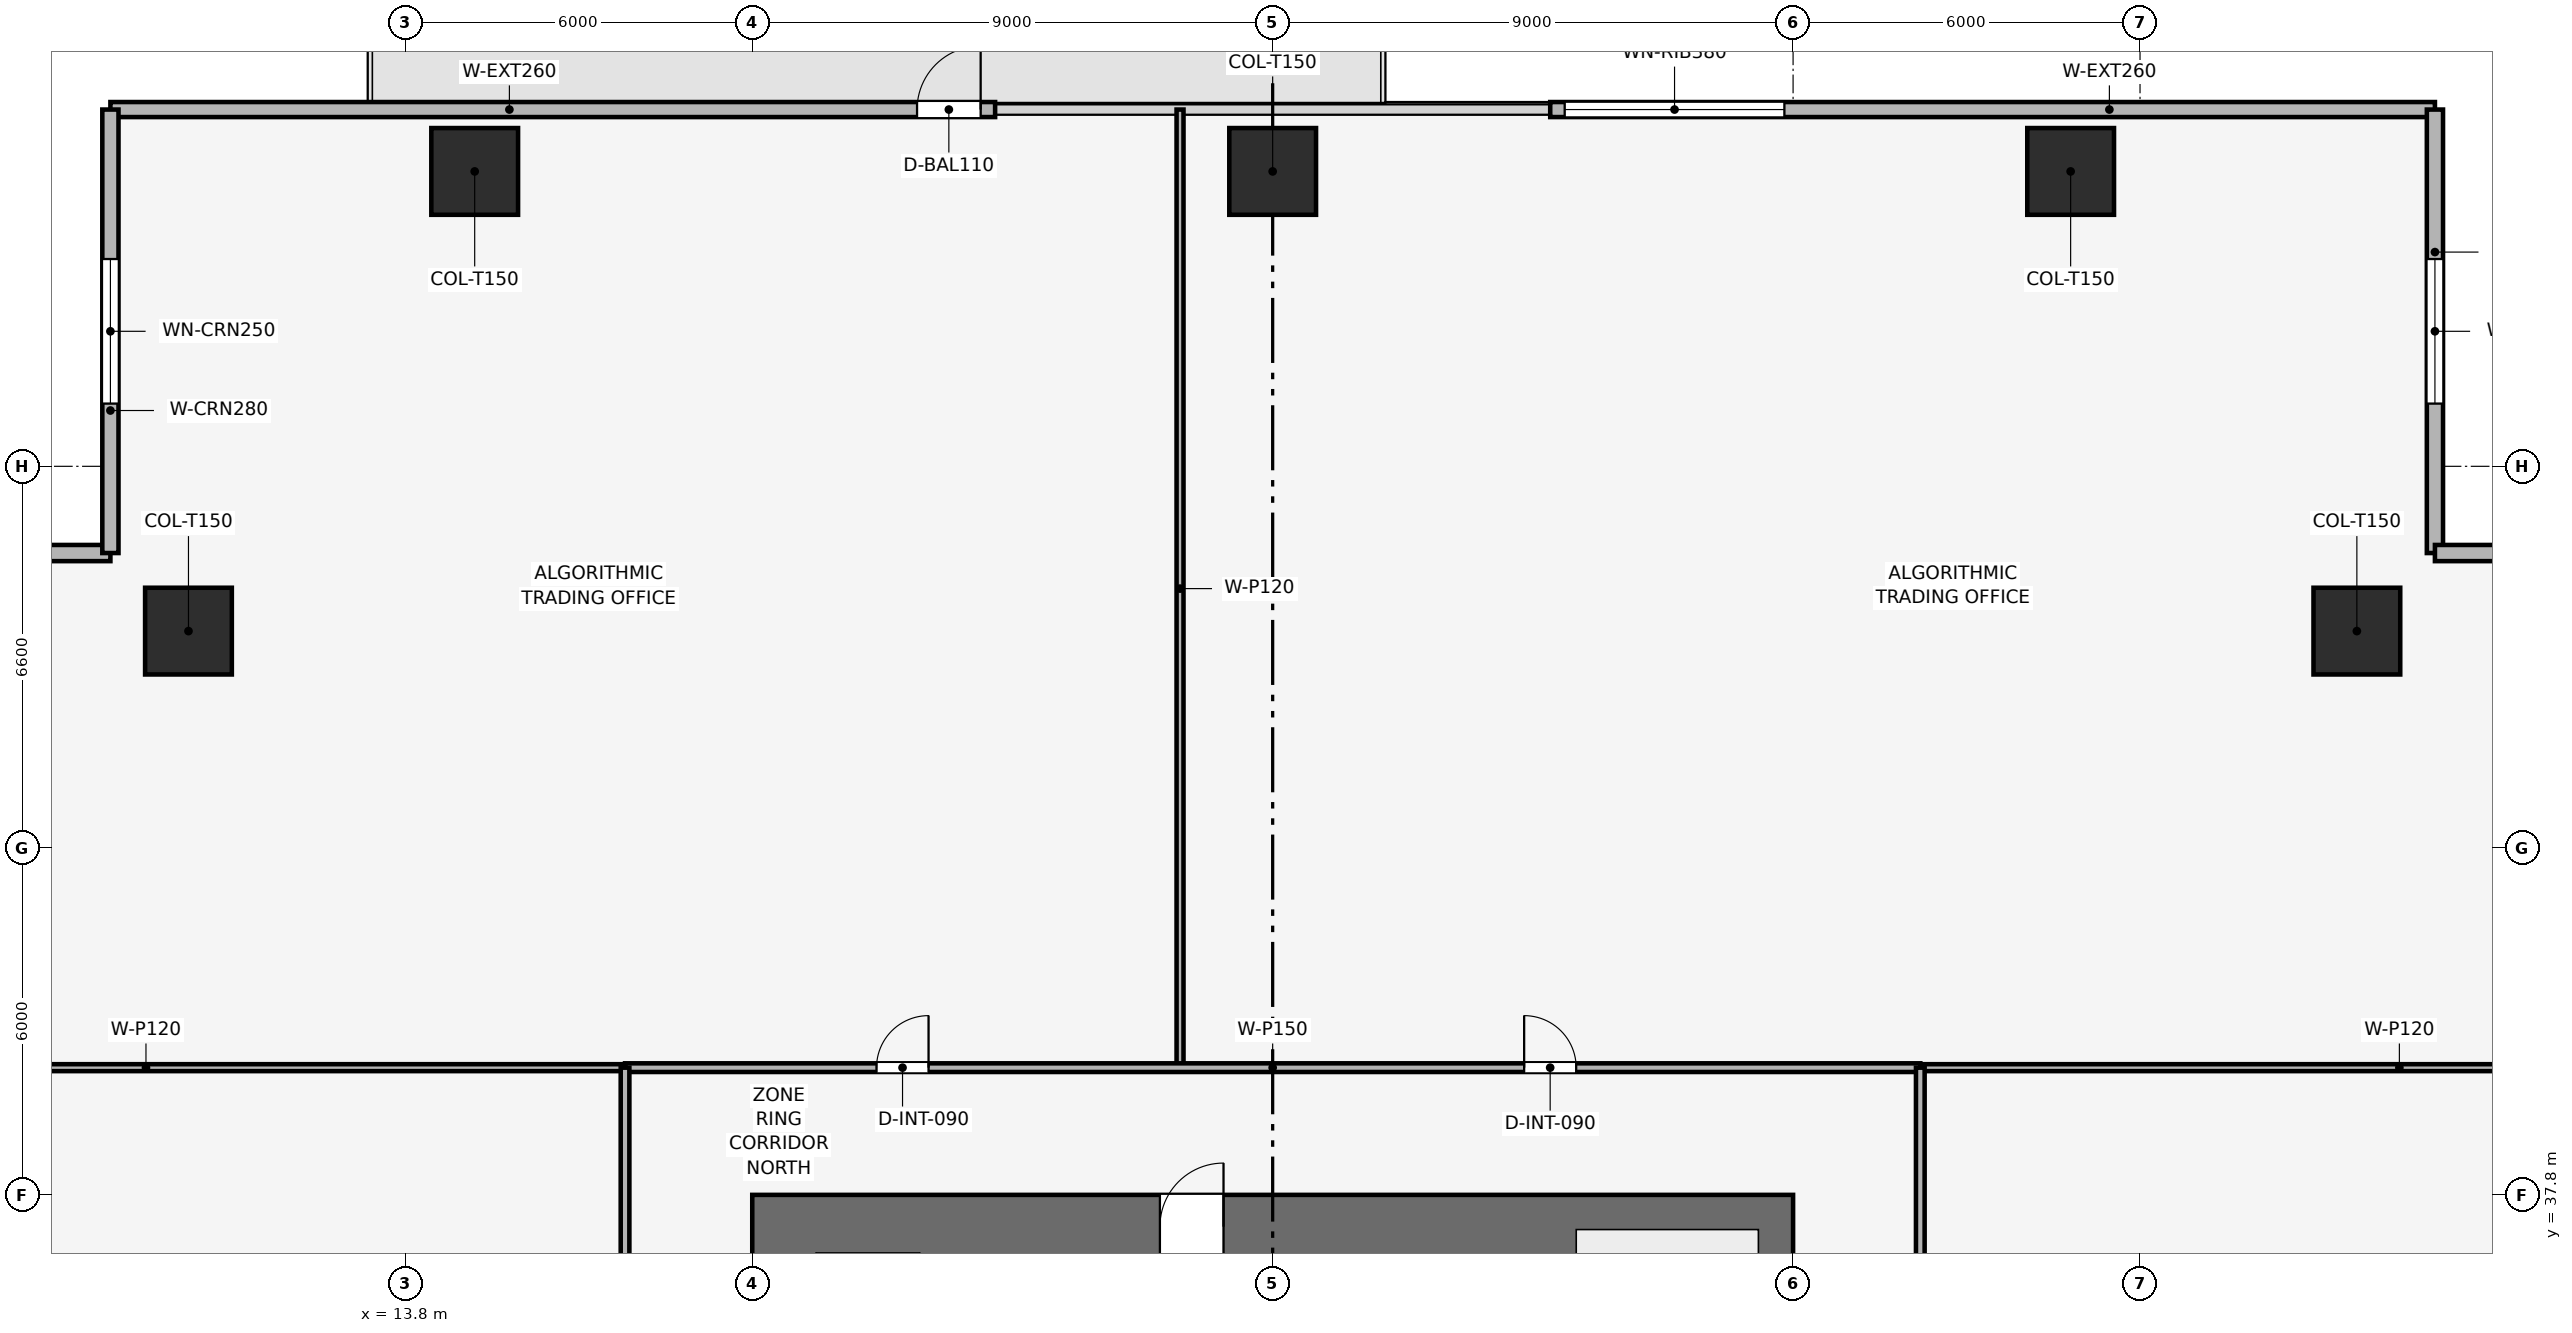
"""IFC4 building model, lengths in metres.
Left out: names, types, materials, properties, quantities, classifications, styles, units other than length and angle.
Written with IfcOpenShell. Run it as: python <this file> out.ifc"""

import sys

from ifc_helpers import new_model, si_unit, direction, frame, frame_2d, origin, origin_2d, place, context, subcontext, project, spatial, rectangle, extrude, element, fill, save


model = new_model("IFC4")
c1 = context("Model", 3, precision=1e-05, world=origin(), true_north=direction((0.0, 1.0)))
c2 = subcontext(c1, "Body", "Model", "MODEL_VIEW")
j1 = project(units=[si_unit("LENGTHUNIT", "METRE"), si_unit("PLANEANGLEUNIT", "RADIAN")], contexts=[c1])
p1 = place(None, origin())
s1 = spatial("IfcSite", under=j1, at=p1, CompositionType="ELEMENT")
p2 = place(p1, origin())
s2 = spatial("IfcBuilding", under=s1, at=p2, CompositionType="ELEMENT")
p3 = place(p2, frame((0.0, 0.0, 84.6)))
s3 = spatial("IfcBuildingStorey", under=s2, at=p3, CompositionType="ELEMENT", Elevation=84.6)
p4 = place(p3, frame((19.8, 37.25, 0.0), z_axis=(0.0, 0.0, 1.0), x_axis=(1.0, 0.0, 0.0)))
e1 = element("IfcWall", 1, at=p4, inside=s3, PredefinedType="SHEAR", context=c2, shape_type="SweptSolid", body=[
    extrude(rectangle(XDim=18.0, YDim=1.1, at=frame_2d((9.0, 0.0))), origin(), (0.0, 0.0, 1.0), 3.9),
])
p5 = place(p4, frame((7.05, 0.0, 0.0)))
e2 = element("IfcOpeningElement", 2, at=p5, cuts=e1, PredefinedType="OPENING", context=c2, shape_type="SweptSolid", body=[
    extrude(rectangle(XDim=1.1, YDim=2.15, at=frame_2d((0.55, 1.075))), frame((0.0, 0.56, 0.0), z_axis=(0.0, -1.0, 0.0), x_axis=(1.0, 0.0, 0.0)), (0.0, 0.0, 1.0), 1.12),
])
for number, where, z_axis, x_axis in (
    (3, (42.6, 55.5, 0.003), (0.0, 0.0, 1.0), (1.0, 0.0, 0.0)),
    (4, (28.8, 55.5, 0.003), (0.0, 0.0, 1.0), (1.0, 0.0, 0.0)),
    (5, (15.0, 55.5, 0.003), (0.0, 0.0, 1.0), (1.0, 0.0, 0.0)),
    (6, (47.55, 47.55, 0.003), (0.0, 0.0, 1.0), (1.0, 0.0, 0.0)),
    (7, (10.05, 47.55, 0.003), (0.0, 0.0, 1.0), (1.0, 0.0, 0.0)),
):
    element("IfcColumn", number, at=place(p3, frame(where, z_axis=z_axis, x_axis=x_axis)), inside=s3, PredefinedType="COLUMN", context=c2, shape_type="SweptSolid", body=[
        extrude(rectangle(XDim=1.5, YDim=1.5, at=origin_2d()), origin(), (0.0, 0.0, 1.0), 3.644),
    ])
p6 = place(p3, frame((8.7, 56.57, 0.0), z_axis=(0.0, 0.0, 1.0), x_axis=(1.0, 0.0, 0.0)))
e8 = element("IfcWall", 8, at=p6, inside=s3, PredefinedType="SOLIDWALL", context=c2, shape_type="SweptSolid", body=[
    extrude(rectangle(XDim=15.3, YDim=0.26, at=frame_2d((7.65, 0.0))), origin(), (0.0, 0.0, 1.0), 3.65),
])
p7 = place(p6, frame((13.95, 0.0, 0.0)))
e9 = element("IfcOpeningElement", 9, at=p7, cuts=e8, PredefinedType="OPENING", context=c2, shape_type="SweptSolid", body=[
    extrude(rectangle(XDim=1.1, YDim=2.2, at=frame_2d((0.55, 1.1))), frame((0.0, 0.14, 0.0), z_axis=(0.0, -1.0, 0.0), x_axis=(1.0, 0.0, 0.0)), (0.0, 0.0, 1.0), 0.28),
])
p8 = place(p3, frame((33.6, 56.57, 0.0), z_axis=(0.0, 0.0, 1.0), x_axis=(1.0, 0.0, 0.0)))
e10 = element("IfcWall", 10, at=p8, inside=s3, PredefinedType="SOLIDWALL", context=c2, shape_type="SweptSolid", body=[
    extrude(rectangle(XDim=15.3, YDim=0.26, at=frame_2d((7.65, 0.0))), origin(), (0.0, 0.0, 1.0), 3.65),
])
p9 = place(p8, frame((0.25, 0.0, 0.9)))
e11 = element("IfcOpeningElement", 11, at=p9, cuts=e10, PredefinedType="OPENING", context=c2, shape_type="SweptSolid", body=[
    extrude(rectangle(XDim=3.8, YDim=1.9, at=frame_2d((1.9, 0.95))), frame((0.0, 0.14, 0.0), z_axis=(0.0, -1.0, 0.0), x_axis=(1.0, 0.0, 0.0)), (0.0, 0.0, 1.0), 0.28),
])
p10 = place(p3, frame((1.03, 48.9, 0.0), z_axis=(0.0, 0.0, 1.0), x_axis=(1.0, 0.0, 0.0)))
e12 = element("IfcWall", 12, at=p10, inside=s3, PredefinedType="SOLIDWALL", context=c2, shape_type="SweptSolid", body=[
    extrude(rectangle(XDim=7.67, YDim=0.28, at=frame_2d((3.835, 0.0))), origin(), (0.0, 0.0, 1.0), 3.65),
])
p11 = place(p10, frame((2.585, 0.0, 0.9)))
e13 = element("IfcOpeningElement", 13, at=p11, cuts=e12, PredefinedType="OPENING", context=c2, shape_type="SweptSolid", body=[
    extrude(rectangle(XDim=2.5, YDim=1.9, at=frame_2d((1.25, 0.95))), frame((0.0, 0.15, 0.0), z_axis=(0.0, -1.0, 0.0), x_axis=(1.0, 0.0, 0.0)), (0.0, 0.0, 1.0), 0.3),
])
p12 = place(p3, frame((8.7, 48.9, 0.0), z_axis=(0.0, 0.0, 1.0), x_axis=(0.0, 1.0, 0.0)))
e14 = element("IfcWall", 14, at=p12, inside=s3, PredefinedType="SOLIDWALL", context=c2, shape_type="SweptSolid", body=[
    extrude(rectangle(XDim=7.67, YDim=0.28, at=frame_2d((3.835, 0.0))), origin(), (0.0, 0.0, 1.0), 3.65),
])
p13 = place(p12, frame((2.585, 0.0, 0.9)))
e15 = element("IfcOpeningElement", 15, at=p13, cuts=e14, PredefinedType="OPENING", context=c2, shape_type="SweptSolid", body=[
    extrude(rectangle(XDim=2.5, YDim=1.9, at=frame_2d((1.25, 0.95))), frame((0.0, 0.15, 0.0), z_axis=(0.0, -1.0, 0.0), x_axis=(1.0, 0.0, 0.0)), (0.0, 0.0, 1.0), 0.3),
])
p14 = place(p3, frame((48.9, 56.57, 0.0), z_axis=(0.0, 0.0, 1.0), x_axis=(0.0, -1.0, 0.0)))
e16 = element("IfcWall", 16, at=p14, inside=s3, PredefinedType="SOLIDWALL", context=c2, shape_type="SweptSolid", body=[
    extrude(rectangle(XDim=7.67, YDim=0.28, at=frame_2d((3.835, 0.0))), origin(), (0.0, 0.0, 1.0), 3.65),
])
p15 = place(p14, frame((2.585, 0.0, 0.9)))
e17 = element("IfcOpeningElement", 17, at=p15, cuts=e16, PredefinedType="OPENING", context=c2, shape_type="SweptSolid", body=[
    extrude(rectangle(XDim=2.5, YDim=1.9, at=frame_2d((1.25, 0.95))), frame((0.0, 0.15, 0.0), z_axis=(0.0, -1.0, 0.0), x_axis=(1.0, 0.0, 0.0)), (0.0, 0.0, 1.0), 0.3),
])
p16 = place(p3, frame((48.9, 48.9, 0.0), z_axis=(0.0, 0.0, 1.0), x_axis=(1.0, 0.0, 0.0)))
e18 = element("IfcWall", 18, at=p16, inside=s3, PredefinedType="SOLIDWALL", context=c2, shape_type="SweptSolid", body=[
    extrude(rectangle(XDim=7.67, YDim=0.28, at=frame_2d((3.835, 0.0))), origin(), (0.0, 0.0, 1.0), 3.65),
])
p17 = place(p16, frame((2.585, 0.0, 0.9)))
e19 = element("IfcOpeningElement", 19, at=p17, cuts=e18, PredefinedType="OPENING", context=c2, shape_type="SweptSolid", body=[
    extrude(rectangle(XDim=2.5, YDim=1.9, at=frame_2d((1.25, 0.95))), frame((0.0, 0.15, 0.0), z_axis=(0.0, -1.0, 0.0), x_axis=(1.0, 0.0, 0.0)), (0.0, 0.0, 1.0), 0.3),
])
for number, where, z_axis, x_axis in (
    (20, (27.198, 40.0, 0.0), (0.0, 0.0, 1.0), (0.0, 1.0, 0.0)),
    (21, (1.03, 40.0, 0.0), (0.0, 0.0, 1.0), (1.0, 0.0, 0.0)),
    (22, (40.0, 40.0, 0.0), (0.0, 0.0, 1.0), (1.0, 0.0, 0.0)),
):
    element("IfcWall", number, at=place(p3, frame(where, z_axis=z_axis, x_axis=x_axis)), inside=s3, PredefinedType="PARTITIONING", context=c2, shape_type="SweptSolid", body=[
        extrude(rectangle(XDim=16.57, YDim=0.12, at=frame_2d((8.285, 0.0))), origin(), (0.0, 0.0, 1.0), 2.935),
    ])
p18 = place(p3, frame((17.6, 40.0, 0.0), z_axis=(0.0, 0.0, 1.0), x_axis=(1.0, 0.0, 0.0)))
e23 = element("IfcWall", 23, at=p18, inside=s3, PredefinedType="PARTITIONING", context=c2, shape_type="SweptSolid", body=[
    extrude(rectangle(XDim=22.4, YDim=0.15, at=frame_2d((11.2, 0.0))), origin(), (0.0, 0.0, 1.0), 3.085),
])
p19 = place(p18, frame((4.349, 0.0, 0.0)))
e24 = element("IfcOpeningElement", 24, at=p19, cuts=e23, PredefinedType="OPENING", context=c2, shape_type="SweptSolid", body=[
    extrude(rectangle(XDim=0.9, YDim=2.1, at=frame_2d((0.45, 1.05))), frame((0.0, 0.085, 0.0), z_axis=(0.0, -1.0, 0.0), x_axis=(1.0, 0.0, 0.0)), (0.0, 0.0, 1.0), 0.17),
])
p20 = place(p18, frame((15.549, 0.0, 0.0)))
e25 = element("IfcOpeningElement", 25, at=p20, cuts=e23, PredefinedType="OPENING", context=c2, shape_type="SweptSolid", body=[
    extrude(rectangle(XDim=0.9, YDim=2.1, at=frame_2d((0.45, 1.05))), frame((0.0, 0.085, 0.0), z_axis=(0.0, -1.0, 0.0), x_axis=(1.0, 0.0, 0.0)), (0.0, 0.0, 1.0), 0.17),
])
p21 = place(p3, frame((17.6, 17.6, 0.0), z_axis=(0.0, 0.0, 1.0), x_axis=(0.0, 1.0, 0.0)))
e26 = element("IfcWall", 26, at=p21, inside=s3, PredefinedType="PARTITIONING", context=c2, shape_type="SweptSolid", body=[
    extrude(rectangle(XDim=22.4, YDim=0.15, at=frame_2d((11.2, 0.0))), origin(), (0.0, 0.0, 1.0), 3.085),
])
p22 = place(p21, frame((0.85, 0.0, 0.0)))
e27 = element("IfcOpeningElement", 27, at=p22, cuts=e26, PredefinedType="OPENING", context=c2, shape_type="SweptSolid", body=[
    extrude(rectangle(XDim=0.9, YDim=2.1, at=frame_2d((0.45, 1.05))), frame((0.0, 0.085, 0.0), z_axis=(0.0, -1.0, 0.0), x_axis=(1.0, 0.0, 0.0)), (0.0, 0.0, 1.0), 0.17),
])
p23 = place(p21, frame((3.55, 0.0, 0.0)))
e28 = element("IfcOpeningElement", 28, at=p23, cuts=e26, PredefinedType="OPENING", context=c2, shape_type="SweptSolid", body=[
    extrude(rectangle(XDim=0.9, YDim=2.1, at=frame_2d((0.45, 1.05))), frame((0.0, 0.085, 0.0), z_axis=(0.0, -1.0, 0.0), x_axis=(1.0, 0.0, 0.0)), (0.0, 0.0, 1.0), 0.17),
])
p24 = place(p21, frame((6.45, 0.0, 0.0)))
e29 = element("IfcOpeningElement", 29, at=p24, cuts=e26, PredefinedType="OPENING", context=c2, shape_type="SweptSolid", body=[
    extrude(rectangle(XDim=0.9, YDim=2.1, at=frame_2d((0.45, 1.05))), frame((0.0, 0.085, 0.0), z_axis=(0.0, -1.0, 0.0), x_axis=(1.0, 0.0, 0.0)), (0.0, 0.0, 1.0), 0.17),
])
p25 = place(p21, frame((9.2, 0.0, 0.0)))
e30 = element("IfcOpeningElement", 30, at=p25, cuts=e26, PredefinedType="OPENING", context=c2, shape_type="SweptSolid", body=[
    extrude(rectangle(XDim=0.95, YDim=2.1, at=frame_2d((0.475, 1.05))), frame((0.0, 0.085, 0.0), z_axis=(0.0, -1.0, 0.0), x_axis=(1.0, 0.0, 0.0)), (0.0, 0.0, 1.0), 0.17),
])
p26 = place(p21, frame((16.25, 0.0, 0.0)))
e31 = element("IfcOpeningElement", 31, at=p26, cuts=e26, PredefinedType="OPENING", context=c2, shape_type="SweptSolid", body=[
    extrude(rectangle(XDim=0.9, YDim=2.1, at=frame_2d((0.45, 1.05))), frame((0.0, 0.085, 0.0), z_axis=(0.0, -1.0, 0.0), x_axis=(1.0, 0.0, 0.0)), (0.0, 0.0, 1.0), 0.17),
])
p27 = place(p3, frame((40.0, 17.6, 0.0), z_axis=(0.0, 0.0, 1.0), x_axis=(0.0, 1.0, 0.0)))
e32 = element("IfcWall", 32, at=p27, inside=s3, PredefinedType="PARTITIONING", context=c2, shape_type="SweptSolid", body=[
    extrude(rectangle(XDim=22.4, YDim=0.15, at=frame_2d((11.2, 0.0))), origin(), (0.0, 0.0, 1.0), 3.085),
])
p28 = place(p27, frame((0.7, 0.0, 0.0)))
e33 = element("IfcOpeningElement", 33, at=p28, cuts=e32, PredefinedType="OPENING", context=c2, shape_type="SweptSolid", body=[
    extrude(rectangle(XDim=0.9, YDim=2.1, at=frame_2d((0.45, 1.05))), frame((0.0, 0.085, 0.0), z_axis=(0.0, -1.0, 0.0), x_axis=(1.0, 0.0, 0.0)), (0.0, 0.0, 1.0), 0.17),
])
p29 = place(p27, frame((6.404, 0.0, 0.0)))
e34 = element("IfcOpeningElement", 34, at=p29, cuts=e32, PredefinedType="OPENING", context=c2, shape_type="SweptSolid", body=[
    extrude(rectangle(XDim=0.9, YDim=2.1, at=frame_2d((0.45, 1.05))), frame((0.0, 0.085, 0.0), z_axis=(0.0, -1.0, 0.0), x_axis=(1.0, 0.0, 0.0)), (0.0, 0.0, 1.0), 0.17),
])
p30 = place(p27, frame((16.454, 0.0, 0.0)))
e35 = element("IfcOpeningElement", 35, at=p30, cuts=e32, PredefinedType="OPENING", context=c2, shape_type="SweptSolid", body=[
    extrude(rectangle(XDim=0.9, YDim=2.1, at=frame_2d((0.45, 1.05))), frame((0.0, 0.085, 0.0), z_axis=(0.0, -1.0, 0.0), x_axis=(1.0, 0.0, 0.0)), (0.0, 0.0, 1.0), 0.17),
])
p31 = place(p7, origin())
e36 = element("IfcDoor", 36, at=p31, inside=s3, OperationType="SINGLE_SWING_RIGHT", PredefinedType="DOOR", context=c2, shape_type="SweptSolid", body=[
    extrude(rectangle(XDim=1.1, YDim=2.2, at=frame_2d((0.55, 1.1))), frame((0.0, 0.025, 0.0), z_axis=(0.0, -1.0, 0.0), x_axis=(1.0, 0.0, 0.0)), (0.0, 0.0, 1.0), 0.05),
])
fill(e9, e36)
p32 = place(p9, origin())
e37 = element("IfcWindow", 37, at=p32, inside=s3, PartitioningType="SINGLE_PANEL", PredefinedType="WINDOW", context=c2, shape_type="SweptSolid", body=[
    extrude(rectangle(XDim=3.8, YDim=1.9, at=frame_2d((1.9, 0.95))), frame((0.0, 0.03, 0.0), z_axis=(0.0, -1.0, 0.0), x_axis=(1.0, 0.0, 0.0)), (0.0, 0.0, 1.0), 0.06),
])
fill(e11, e37)
p33 = place(p13, origin())
e38 = element("IfcWindow", 38, at=p33, inside=s3, PartitioningType="SINGLE_PANEL", PredefinedType="WINDOW", context=c2, shape_type="SweptSolid", body=[
    extrude(rectangle(XDim=2.5, YDim=1.9, at=frame_2d((1.25, 0.95))), frame((0.0, 0.03, 0.0), z_axis=(0.0, -1.0, 0.0), x_axis=(1.0, 0.0, 0.0)), (0.0, 0.0, 1.0), 0.06),
])
fill(e15, e38)
p34 = place(p15, origin())
e39 = element("IfcWindow", 39, at=p34, inside=s3, PartitioningType="SINGLE_PANEL", PredefinedType="WINDOW", context=c2, shape_type="SweptSolid", body=[
    extrude(rectangle(XDim=2.5, YDim=1.9, at=frame_2d((1.25, 0.95))), frame((0.0, 0.03, 0.0), z_axis=(0.0, -1.0, 0.0), x_axis=(1.0, 0.0, 0.0)), (0.0, 0.0, 1.0), 0.06),
])
fill(e17, e39)
p35 = place(p19, origin())
e40 = element("IfcDoor", 40, at=p35, inside=s3, OperationType="SINGLE_SWING_RIGHT", PredefinedType="DOOR", context=c2, shape_type="SweptSolid", body=[
    extrude(rectangle(XDim=0.9, YDim=2.1, at=frame_2d((0.45, 1.05))), frame((0.0, 0.025, 0.0), z_axis=(0.0, -1.0, 0.0), x_axis=(1.0, 0.0, 0.0)), (0.0, 0.0, 1.0), 0.05),
])
fill(e24, e40)
p36 = place(p20, origin())
e41 = element("IfcDoor", 41, at=p36, inside=s3, OperationType="SINGLE_SWING_LEFT", PredefinedType="DOOR", context=c2, shape_type="SweptSolid", body=[
    extrude(rectangle(XDim=0.9, YDim=2.1, at=frame_2d((0.45, 1.05))), frame((0.0, 0.025, 0.0), z_axis=(0.0, -1.0, 0.0), x_axis=(1.0, 0.0, 0.0)), (0.0, 0.0, 1.0), 0.05),
])
fill(e25, e41)
p37 = place(p5, origin())
e42 = element("IfcDoor", 42, at=p37, inside=s3, OperationType="SINGLE_SWING_RIGHT", PredefinedType="DOOR", context=c2, shape_type="SweptSolid", body=[
    extrude(rectangle(XDim=1.1, YDim=2.15, at=frame_2d((0.55, 1.075))), frame((0.0, 0.025, 0.0), z_axis=(0.0, -1.0, 0.0), x_axis=(1.0, 0.0, 0.0)), (0.0, 0.0, 1.0), 0.05),
])
fill(e2, e42)
save(model, sys.argv[1])
